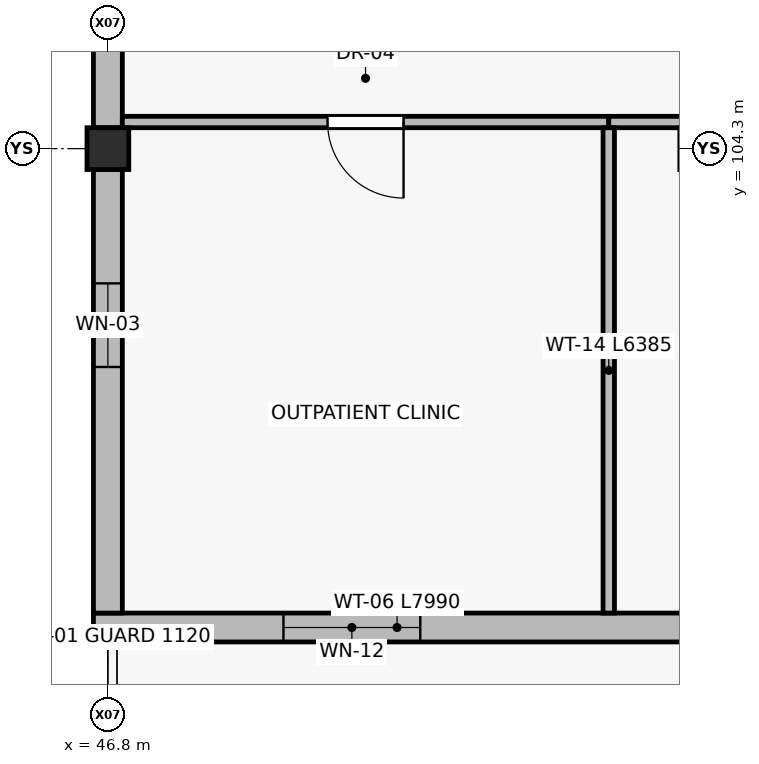
"""IFC4 building model, lengths in metres.
Left out: names, types, materials, properties, quantities, classifications, styles, units other than length and angle.
Written with IfcOpenShell. Run it as: python <this file> out.ifc"""

import sys

from ifc_helpers import new_model, si_unit, direction, frame, frame_2d, origin, origin_2d, place, context, subcontext, project, spatial, rectangle, extrude, element, fill, save


model = new_model("IFC4")
c1 = context("Model", 3, precision=1e-05, world=origin(), true_north=direction((0.0, 1.0)))
c2 = subcontext(c1, "Body", "Model", "MODEL_VIEW")
j1 = project(units=[si_unit("LENGTHUNIT", "METRE"), si_unit("PLANEANGLEUNIT", "RADIAN")], contexts=[c1])
p1 = place(None, origin())
s1 = spatial("IfcSite", under=j1, at=p1, CompositionType="ELEMENT")
p2 = place(p1, origin())
s2 = spatial("IfcBuilding", under=s1, at=p2, CompositionType="ELEMENT")
p3 = place(p2, frame((0.0, 0.0, 9.6)))
s3 = spatial("IfcBuildingStorey", under=s2, at=p3, CompositionType="ELEMENT", Elevation=9.6)
p4 = place(p3, frame((46.8, 104.3, 0.0), z_axis=(0.0, 0.0, 1.0), x_axis=(1.0, 0.0, 0.0)))
e1 = element("IfcColumn", 1, at=p4, inside=s3, PredefinedType="COLUMN", context=c2, shape_type="SweptSolid", body=[
    extrude(rectangle(XDim=0.55, YDim=0.55, at=origin_2d()), origin(), (0.0, 0.0, 1.0), 4.5),
])
p5 = place(p3, frame((54.6, 98.0, 0.0), z_axis=(0.0, 0.0, 1.0), x_axis=(-1.0, 0.0, 0.0)))
e2 = element("IfcWall", 2, at=p5, inside=s3, PredefinedType="STANDARD", context=c2, shape_type="SweptSolid", body=[
    extrude(rectangle(XDim=7.99, YDim=0.38, at=frame_2d((3.995, 0.0))), origin(), (0.0, 0.0, 1.0), 4.24),
])
p6 = place(p5, frame((3.69, 0.0, 0.9)))
e3 = element("IfcOpeningElement", 3, at=p6, cuts=e2, PredefinedType="OPENING", context=c2, shape_type="SweptSolid", body=[
    extrude(rectangle(XDim=1.8, YDim=1.5, at=frame_2d((0.9, 0.75))), frame((0.0, 0.2, 0.0), z_axis=(0.0, -1.0, 0.0), x_axis=(1.0, 0.0, 0.0)), (0.0, 0.0, 1.0), 0.4),
])
p7 = place(p3, frame((46.8, 98.19, 0.0), z_axis=(0.0, 0.0, 1.0), x_axis=(0.0, 1.0, 0.0)))
e4 = element("IfcWall", 4, at=p7, inside=s3, PredefinedType="STANDARD", context=c2, shape_type="SweptSolid", body=[
    extrude(rectangle(XDim=5.835, YDim=0.38, at=frame_2d((2.917, 0.0))), origin(), (0.0, 0.0, 1.0), 3.84),
])
p8 = place(p7, frame((3.238, 0.0, 0.9)))
e5 = element("IfcOpeningElement", 5, at=p8, cuts=e4, PredefinedType="OPENING", context=c2, shape_type="SweptSolid", body=[
    extrude(rectangle(XDim=1.1, YDim=1.6, at=frame_2d((0.55, 0.8))), frame((0.0, 0.2, 0.0), z_axis=(0.0, -1.0, 0.0), x_axis=(1.0, 0.0, 0.0)), (0.0, 0.0, 1.0), 0.4),
])
p9 = place(p3, frame((46.8, 104.575, 0.0), z_axis=(0.0, 0.0, 1.0), x_axis=(0.0, 1.0, 0.0)))
e6 = element("IfcWall", 6, at=p9, inside=s3, PredefinedType="STANDARD", context=c2, shape_type="SweptSolid", body=[
    extrude(rectangle(XDim=3.35, YDim=0.38, at=frame_2d((1.675, 0.0))), origin(), (0.0, 0.0, 1.0), 3.84),
])
p10 = place(p9, frame((1.15, 0.0, 0.9)))
e7 = element("IfcOpeningElement", 7, at=p10, cuts=e6, PredefinedType="OPENING", context=c2, shape_type="SweptSolid", body=[
    extrude(rectangle(XDim=1.05, YDim=1.65, at=frame_2d((0.525, 0.825))), frame((0.0, 0.2, 0.0), z_axis=(0.0, -1.0, 0.0), x_axis=(1.0, 0.0, 0.0)), (0.0, 0.0, 1.0), 0.4),
])
p11 = place(p3, frame((53.39, 104.65, 0.0), z_axis=(0.0, 0.0, 1.0), x_axis=(-1.0, 0.0, 0.0)))
e8 = element("IfcWall", 8, at=p11, inside=s3, PredefinedType="PARTITIONING", context=c2, shape_type="SweptSolid", body=[
    extrude(rectangle(XDim=6.4, YDim=0.15, at=frame_2d((3.2, 0.0))), origin(), (0.0, 0.0, 1.0), 3.74),
])
p12 = place(p11, frame((2.7, 0.0, 0.0)))
e9 = element("IfcOpeningElement", 9, at=p12, cuts=e8, PredefinedType="OPENING", context=c2, shape_type="SweptSolid", body=[
    extrude(rectangle(XDim=1.0, YDim=2.1, at=frame_2d((0.5, 1.05))), frame((0.0, 0.085, 0.0), z_axis=(0.0, -1.0, 0.0), x_axis=(1.0, 0.0, 0.0)), (0.0, 0.0, 1.0), 0.17),
])
p13 = place(p3, frame((58.34, 104.65, 0.0), z_axis=(0.0, 0.0, 1.0), x_axis=(-1.0, 0.0, 0.0)))
e10 = element("IfcWall", 10, at=p13, inside=s3, PredefinedType="PARTITIONING", context=c2, shape_type="SweptSolid", body=[
    extrude(rectangle(XDim=4.95, YDim=0.15, at=frame_2d((2.475, 0.0))), origin(), (0.0, 0.0, 1.0), 3.74),
])
p14 = place(p13, frame((1.95, 0.0, 0.0)))
e11 = element("IfcOpeningElement", 11, at=p14, cuts=e10, PredefinedType="OPENING", context=c2, shape_type="SweptSolid", body=[
    extrude(rectangle(XDim=1.05, YDim=2.15, at=frame_2d((0.525, 1.075))), frame((0.0, 0.085, 0.0), z_axis=(0.0, -1.0, 0.0), x_axis=(1.0, 0.0, 0.0)), (0.0, 0.0, 1.0), 0.17),
])
p15 = place(p3, frame((53.39, 98.19, 0.0), z_axis=(0.0, 0.0, 1.0), x_axis=(0.0, 1.0, 0.0)))
e12 = element("IfcWall", 12, at=p15, inside=s3, PredefinedType="PARTITIONING", context=c2, shape_type="SweptSolid", body=[
    extrude(rectangle(XDim=6.385, YDim=0.15, at=frame_2d((3.192, 0.0))), origin(), (0.0, 0.0, 1.0), 4.24),
])
p16 = place(p6, origin())
e13 = element("IfcWindow", 13, at=p16, inside=s3, PartitioningType="SINGLE_PANEL", PredefinedType="WINDOW", context=c2, shape_type="SweptSolid", body=[
    extrude(rectangle(XDim=1.8, YDim=1.5, at=frame_2d((0.9, 0.75))), frame((0.0, 0.03, 0.0), z_axis=(0.0, -1.0, 0.0), x_axis=(1.0, 0.0, 0.0)), (0.0, 0.0, 1.0), 0.06),
])
fill(e3, e13)
p17 = place(p8, origin())
e14 = element("IfcWindow", 14, at=p17, inside=s3, PartitioningType="SINGLE_PANEL", PredefinedType="WINDOW", context=c2, shape_type="SweptSolid", body=[
    extrude(rectangle(XDim=1.1, YDim=1.6, at=frame_2d((0.55, 0.8))), frame((0.0, 0.03, 0.0), z_axis=(0.0, -1.0, 0.0), x_axis=(1.0, 0.0, 0.0)), (0.0, 0.0, 1.0), 0.06),
])
fill(e5, e14)
p18 = place(p12, origin())
e15 = element("IfcDoor", 15, at=p18, inside=s3, OperationType="SINGLE_SWING_LEFT", PredefinedType="DOOR", context=c2, shape_type="SweptSolid", body=[
    extrude(rectangle(XDim=1.0, YDim=2.1, at=frame_2d((0.5, 1.05))), frame((0.0, 0.025, 0.0), z_axis=(0.0, -1.0, 0.0), x_axis=(1.0, 0.0, 0.0)), (0.0, 0.0, 1.0), 0.05),
])
fill(e9, e15)
save(model, sys.argv[1])
